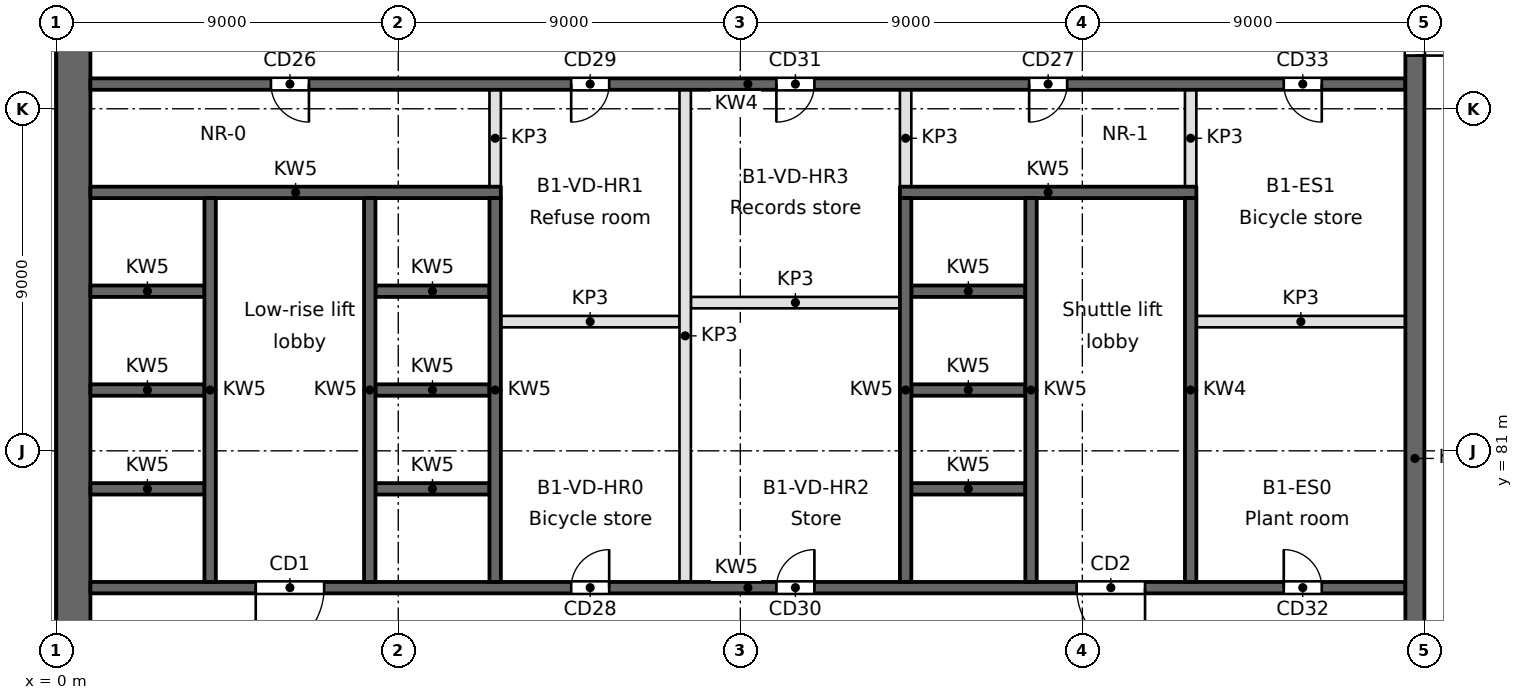
"""IFC4 building model, lengths in metres.
Left out: names, types, materials, properties, quantities, classifications, styles, units other than length and angle.
Written with IfcOpenShell. Run it as: python <this file> out.ifc"""

import sys

from ifc_helpers import new_model, si_unit, direction, frame, frame_2d, origin, place, context, subcontext, project, spatial, rectangle, extrude, element, fill, save


model = new_model("IFC4")
c1 = context("Model", 3, precision=1e-05, world=origin(), true_north=direction((0.0, 1.0)))
c2 = subcontext(c1, "Body", "Model", "MODEL_VIEW")
j1 = project(units=[si_unit("LENGTHUNIT", "METRE"), si_unit("PLANEANGLEUNIT", "RADIAN")], contexts=[c1])
p1 = place(None, origin())
s1 = spatial("IfcSite", under=j1, at=p1, CompositionType="ELEMENT")
p2 = place(p1, origin())
s2 = spatial("IfcBuilding", under=s1, at=p2, CompositionType="ELEMENT")
p3 = place(p2, frame((0.0, 0.0, -6.0)))
s3 = spatial("IfcBuildingStorey", under=s2, at=p3, CompositionType="ELEMENT", Elevation=-6.0)
p4 = place(p3, frame((0.45, 94.5, 0.0), z_axis=(0.0, 0.0, 1.0), x_axis=(0.0, -1.0, 0.0)))
e1 = element("IfcWall", 1, at=p4, inside=s3, PredefinedType="SHEAR", context=c2, shape_type="SweptSolid", body=[
    extrude(rectangle(XDim=66.085, YDim=0.9, at=frame_2d((33.042, 0.0))), origin(), (0.0, 0.0, 1.0), 6.0),
])
p5 = place(p3, frame((0.9, 77.4, 0.0), z_axis=(0.0, 0.0, 1.0), x_axis=(1.0, 0.0, 0.0)))
e2 = element("IfcWall", 2, at=p5, inside=s3, PredefinedType="SOLIDWALL", context=c2, shape_type="SweptSolid", body=[
    extrude(rectangle(XDim=34.6, YDim=0.3, at=frame_2d((17.3, 0.0))), origin(), (0.0, 0.0, 1.0), 5.6),
])
p6 = place(p5, frame((4.35, 0.0, 0.0)))
e3 = element("IfcOpeningElement", 3, at=p6, cuts=e2, PredefinedType="OPENING", context=c2, shape_type="SweptSolid", body=[
    extrude(rectangle(XDim=1.8, YDim=2.1, at=frame_2d((0.9, 1.05))), frame((0.0, 0.15, 0.0), z_axis=(0.0, -1.0, 0.0), x_axis=(1.0, 0.0, 0.0)), (0.0, 0.0, 1.0), 0.3),
])
p7 = place(p5, frame((25.95, 0.0, 0.0)))
e4 = element("IfcOpeningElement", 4, at=p7, cuts=e2, PredefinedType="OPENING", context=c2, shape_type="SweptSolid", body=[
    extrude(rectangle(XDim=1.8, YDim=2.1, at=frame_2d((0.9, 1.05))), frame((0.0, 0.15, 0.0), z_axis=(0.0, -1.0, 0.0), x_axis=(1.0, 0.0, 0.0)), (0.0, 0.0, 1.0), 0.3),
])
p8 = place(p5, frame((12.65, 0.0, 0.0)))
e5 = element("IfcOpeningElement", 5, at=p8, cuts=e2, PredefinedType="OPENING", context=c2, shape_type="SweptSolid", body=[
    extrude(rectangle(XDim=1.0, YDim=2.1, at=frame_2d((0.5, 1.05))), frame((0.0, 0.15, 0.0), z_axis=(0.0, -1.0, 0.0), x_axis=(1.0, 0.0, 0.0)), (0.0, 0.0, 1.0), 0.3),
])
p9 = place(p5, frame((18.05, 0.0, 0.0)))
e6 = element("IfcOpeningElement", 6, at=p9, cuts=e2, PredefinedType="OPENING", context=c2, shape_type="SweptSolid", body=[
    extrude(rectangle(XDim=1.0, YDim=2.1, at=frame_2d((0.5, 1.05))), frame((0.0, 0.15, 0.0), z_axis=(0.0, -1.0, 0.0), x_axis=(1.0, 0.0, 0.0)), (0.0, 0.0, 1.0), 0.3),
])
p10 = place(p5, frame((31.4, 0.0, 0.0)))
e7 = element("IfcOpeningElement", 7, at=p10, cuts=e2, PredefinedType="OPENING", context=c2, shape_type="SweptSolid", body=[
    extrude(rectangle(XDim=1.0, YDim=2.1, at=frame_2d((0.5, 1.05))), frame((0.0, 0.15, 0.0), z_axis=(0.0, -1.0, 0.0), x_axis=(1.0, 0.0, 0.0)), (0.0, 0.0, 1.0), 0.3),
])
for number, where, z_axis, x_axis in (
    (8, (0.9, 80.0, 0.0), (0.0, 0.0, 1.0), (1.0, 0.0, 0.0)),
    (9, (8.4, 80.0, 0.0), (0.0, 0.0, 1.0), (1.0, 0.0, 0.0)),
    (10, (22.5, 80.0, 0.0), (0.0, 0.0, 1.0), (1.0, 0.0, 0.0)),
    (11, (0.9, 82.6, 0.0), (0.0, 0.0, 1.0), (1.0, 0.0, 0.0)),
    (12, (8.4, 82.6, 0.0), (0.0, 0.0, 1.0), (1.0, 0.0, 0.0)),
    (13, (22.5, 82.6, 0.0), (0.0, 0.0, 1.0), (1.0, 0.0, 0.0)),
):
    element("IfcWall", number, at=place(p3, frame(where, z_axis=z_axis, x_axis=x_axis)), inside=s3, PredefinedType="SOLIDWALL", context=c2, shape_type="SweptSolid", body=[
        extrude(rectangle(XDim=3.0, YDim=0.3, at=frame_2d((1.5, 0.0))), origin(), (0.0, 0.0, 1.0), 5.6),
    ])
p11 = place(p3, frame((11.7, 84.4, 0.0), z_axis=(0.0, 0.0, 1.0), x_axis=(1.0, 0.0, 0.0)))
e14 = element("IfcWall", 14, at=p11, inside=s3, PredefinedType="PARTITIONING", context=c2, shape_type="SweptSolid", body=[
    extrude(rectangle(XDim=4.7, YDim=0.3, at=frame_2d((2.35, 0.0))), origin(), (0.0, 0.0, 1.0), 5.6),
])
for number, where, z_axis, x_axis in (
    (15, (30.0, 84.4, 0.0), (0.0, 0.0, 1.0), (1.0, 0.0, 0.0)),
    (16, (16.7, 84.9, 0.0), (0.0, 0.0, 1.0), (1.0, 0.0, 0.0)),
):
    element("IfcWall", number, at=place(p3, frame(where, z_axis=z_axis, x_axis=x_axis)), inside=s3, PredefinedType="PARTITIONING", context=c2, shape_type="SweptSolid", body=[
        extrude(rectangle(XDim=5.5, YDim=0.3, at=frame_2d((2.75, 0.0))), origin(), (0.0, 0.0, 1.0), 5.6),
    ])
for number, where, z_axis, x_axis in (
    (17, (0.9, 85.2, 0.0), (0.0, 0.0, 1.0), (1.0, 0.0, 0.0)),
    (18, (8.4, 85.2, 0.0), (0.0, 0.0, 1.0), (1.0, 0.0, 0.0)),
    (19, (22.5, 85.2, 0.0), (0.0, 0.0, 1.0), (1.0, 0.0, 0.0)),
):
    element("IfcWall", number, at=place(p3, frame(where, z_axis=z_axis, x_axis=x_axis)), inside=s3, PredefinedType="SOLIDWALL", context=c2, shape_type="SweptSolid", body=[
        extrude(rectangle(XDim=3.0, YDim=0.3, at=frame_2d((1.5, 0.0))), origin(), (0.0, 0.0, 1.0), 5.6),
    ])
p12 = place(p3, frame((0.9, 87.8, 0.0), z_axis=(0.0, 0.0, 1.0), x_axis=(1.0, 0.0, 0.0)))
e20 = element("IfcWall", 20, at=p12, inside=s3, PredefinedType="SOLIDWALL", context=c2, shape_type="SweptSolid", body=[
    extrude(rectangle(XDim=10.8, YDim=0.3, at=frame_2d((5.4, 0.0))), origin(), (0.0, 0.0, 1.0), 5.6),
])
p13 = place(p3, frame((22.2, 87.8, 0.0), z_axis=(0.0, 0.0, 1.0), x_axis=(1.0, 0.0, 0.0)))
e21 = element("IfcWall", 21, at=p13, inside=s3, PredefinedType="SOLIDWALL", context=c2, shape_type="SweptSolid", body=[
    extrude(rectangle(XDim=7.8, YDim=0.3, at=frame_2d((3.9, 0.0))), origin(), (0.0, 0.0, 1.0), 5.6),
])
p14 = place(p3, frame((0.9, 90.65, 0.0), z_axis=(0.0, 0.0, 1.0), x_axis=(1.0, 0.0, 0.0)))
e22 = element("IfcWall", 22, at=p14, inside=s3, PredefinedType="SOLIDWALL", context=c2, shape_type="SweptSolid", body=[
    extrude(rectangle(XDim=34.6, YDim=0.3, at=frame_2d((17.3, 0.0))), origin(), (0.0, 0.0, 1.0), 5.6),
])
p15 = place(p14, frame((4.75, 0.0, 0.0)))
e23 = element("IfcOpeningElement", 23, at=p15, cuts=e22, PredefinedType="OPENING", context=c2, shape_type="SweptSolid", body=[
    extrude(rectangle(XDim=1.0, YDim=2.1, at=frame_2d((0.5, 1.05))), frame((0.0, 0.15, 0.0), z_axis=(0.0, -1.0, 0.0), x_axis=(1.0, 0.0, 0.0)), (0.0, 0.0, 1.0), 0.3),
])
p16 = place(p14, frame((24.7, 0.0, 0.0)))
e24 = element("IfcOpeningElement", 24, at=p16, cuts=e22, PredefinedType="OPENING", context=c2, shape_type="SweptSolid", body=[
    extrude(rectangle(XDim=1.0, YDim=2.1, at=frame_2d((0.5, 1.05))), frame((0.0, 0.15, 0.0), z_axis=(0.0, -1.0, 0.0), x_axis=(1.0, 0.0, 0.0)), (0.0, 0.0, 1.0), 0.3),
])
p17 = place(p14, frame((12.65, 0.0, 0.0)))
e25 = element("IfcOpeningElement", 25, at=p17, cuts=e22, PredefinedType="OPENING", context=c2, shape_type="SweptSolid", body=[
    extrude(rectangle(XDim=1.0, YDim=2.1, at=frame_2d((0.5, 1.05))), frame((0.0, 0.15, 0.0), z_axis=(0.0, -1.0, 0.0), x_axis=(1.0, 0.0, 0.0)), (0.0, 0.0, 1.0), 0.3),
])
p18 = place(p14, frame((18.05, 0.0, 0.0)))
e26 = element("IfcOpeningElement", 26, at=p18, cuts=e22, PredefinedType="OPENING", context=c2, shape_type="SweptSolid", body=[
    extrude(rectangle(XDim=1.0, YDim=2.1, at=frame_2d((0.5, 1.05))), frame((0.0, 0.15, 0.0), z_axis=(0.0, -1.0, 0.0), x_axis=(1.0, 0.0, 0.0)), (0.0, 0.0, 1.0), 0.3),
])
p19 = place(p14, frame((31.4, 0.0, 0.0)))
e27 = element("IfcOpeningElement", 27, at=p19, cuts=e22, PredefinedType="OPENING", context=c2, shape_type="SweptSolid", body=[
    extrude(rectangle(XDim=1.0, YDim=2.1, at=frame_2d((0.5, 1.05))), frame((0.0, 0.15, 0.0), z_axis=(0.0, -1.0, 0.0), x_axis=(1.0, 0.0, 0.0)), (0.0, 0.0, 1.0), 0.3),
])
for number, where, z_axis, x_axis in (
    (28, (4.05, 77.55, 0.0), (0.0, 0.0, 1.0), (0.0, 1.0, 0.0)),
    (29, (8.25, 77.55, 0.0), (0.0, 0.0, 1.0), (0.0, 1.0, 0.0)),
    (30, (11.55, 77.55, 0.0), (0.0, 0.0, 1.0), (0.0, 1.0, 0.0)),
):
    element("IfcWall", number, at=place(p3, frame(where, z_axis=z_axis, x_axis=x_axis)), inside=s3, PredefinedType="SOLIDWALL", context=c2, shape_type="SweptSolid", body=[
        extrude(rectangle(XDim=10.1, YDim=0.3, at=frame_2d((5.05, 0.0))), origin(), (0.0, 0.0, 1.0), 5.6),
    ])
p20 = place(p3, frame((11.55, 87.95, 0.0), z_axis=(0.0, 0.0, 1.0), x_axis=(0.0, 1.0, 0.0)))
e31 = element("IfcWall", 31, at=p20, inside=s3, PredefinedType="PARTITIONING", context=c2, shape_type="SweptSolid", body=[
    extrude(rectangle(XDim=2.55, YDim=0.3, at=frame_2d((1.275, 0.0))), origin(), (0.0, 0.0, 1.0), 5.6),
])
p21 = place(p3, frame((16.55, 77.55, 0.0), z_axis=(0.0, 0.0, 1.0), x_axis=(0.0, 1.0, 0.0)))
e32 = element("IfcWall", 32, at=p21, inside=s3, PredefinedType="PARTITIONING", context=c2, shape_type="SweptSolid", body=[
    extrude(rectangle(XDim=12.95, YDim=0.3, at=frame_2d((6.475, 0.0))), origin(), (0.0, 0.0, 1.0), 5.6),
])
p22 = place(p3, frame((22.35, 77.55, 0.0), z_axis=(0.0, 0.0, 1.0), x_axis=(0.0, 1.0, 0.0)))
e33 = element("IfcWall", 33, at=p22, inside=s3, PredefinedType="SOLIDWALL", context=c2, shape_type="SweptSolid", body=[
    extrude(rectangle(XDim=10.1, YDim=0.3, at=frame_2d((5.05, 0.0))), origin(), (0.0, 0.0, 1.0), 5.6),
])
p23 = place(p3, frame((22.35, 87.95, 0.0), z_axis=(0.0, 0.0, 1.0), x_axis=(0.0, 1.0, 0.0)))
e34 = element("IfcWall", 34, at=p23, inside=s3, PredefinedType="PARTITIONING", context=c2, shape_type="SweptSolid", body=[
    extrude(rectangle(XDim=2.55, YDim=0.3, at=frame_2d((1.275, 0.0))), origin(), (0.0, 0.0, 1.0), 5.6),
])
for number, where, z_axis, x_axis in (
    (35, (25.65, 77.55, 0.0), (0.0, 0.0, 1.0), (0.0, 1.0, 0.0)),
    (36, (29.85, 77.55, 0.0), (0.0, 0.0, 1.0), (0.0, 1.0, 0.0)),
):
    element("IfcWall", number, at=place(p3, frame(where, z_axis=z_axis, x_axis=x_axis)), inside=s3, PredefinedType="SOLIDWALL", context=c2, shape_type="SweptSolid", body=[
        extrude(rectangle(XDim=10.1, YDim=0.3, at=frame_2d((5.05, 0.0))), origin(), (0.0, 0.0, 1.0), 5.6),
    ])
p24 = place(p3, frame((29.85, 87.95, 0.0), z_axis=(0.0, 0.0, 1.0), x_axis=(0.0, 1.0, 0.0)))
e37 = element("IfcWall", 37, at=p24, inside=s3, PredefinedType="PARTITIONING", context=c2, shape_type="SweptSolid", body=[
    extrude(rectangle(XDim=2.55, YDim=0.3, at=frame_2d((1.275, 0.0))), origin(), (0.0, 0.0, 1.0), 5.6),
])
p25 = place(p3, frame((35.75, 63.5, 0.0), z_axis=(0.0, 0.0, 1.0), x_axis=(0.0, 1.0, 0.0)))
e38 = element("IfcWall", 38, at=p25, inside=s3, PredefinedType="SOLIDWALL", context=c2, shape_type="SweptSolid", body=[
    extrude(rectangle(XDim=34.6, YDim=0.5, at=frame_2d((17.3, 0.0))), origin(), (0.0, 0.0, 1.0), 5.6),
])
p26 = place(p25, frame((9.7, 0.0, 0.0)))
e39 = element("IfcOpeningElement", 39, at=p26, cuts=e38, PredefinedType="OPENING", context=c2, shape_type="SweptSolid", body=[
    extrude(rectangle(XDim=2.4, YDim=2.1, at=frame_2d((1.2, 1.05))), frame((0.0, 0.25, 0.0), z_axis=(0.0, -1.0, 0.0), x_axis=(1.0, 0.0, 0.0)), (0.0, 0.0, 1.0), 0.5),
])
p27 = place(p25, frame((27.9, 0.0, 0.0)))
e40 = element("IfcOpeningElement", 40, at=p27, cuts=e38, PredefinedType="OPENING", context=c2, shape_type="SweptSolid", body=[
    extrude(rectangle(XDim=1.5, YDim=2.1, at=frame_2d((0.75, 1.05))), frame((0.0, 0.25, 0.0), z_axis=(0.0, -1.0, 0.0), x_axis=(1.0, 0.0, 0.0)), (0.0, 0.0, 1.0), 0.5),
])
p28 = place(p25, frame((1.5, 0.0, 0.0)))
e41 = element("IfcOpeningElement", 41, at=p28, cuts=e38, PredefinedType="OPENING", context=c2, shape_type="SweptSolid", body=[
    extrude(rectangle(XDim=1.2, YDim=2.1, at=frame_2d((0.6, 1.05))), frame((0.0, 0.25, 0.0), z_axis=(0.0, -1.0, 0.0), x_axis=(1.0, 0.0, 0.0)), (0.0, 0.0, 1.0), 0.5),
])
p29 = place(p6, frame((1.8, 0.0, 0.0), z_axis=(0.0, 0.0, 1.0), x_axis=(-1.0, 0.0, 0.0)))
e42 = element("IfcDoor", 42, at=p29, inside=s3, OperationType="SINGLE_SWING_RIGHT", PredefinedType="DOOR", context=c2, shape_type="SweptSolid", body=[
    extrude(rectangle(XDim=1.8, YDim=2.1, at=frame_2d((0.9, 1.05))), frame((0.0, 0.025, 0.0), z_axis=(0.0, -1.0, 0.0), x_axis=(1.0, 0.0, 0.0)), (0.0, 0.0, 1.0), 0.05),
])
fill(e3, e42)
p30 = place(p7, frame((1.8, 0.0, 0.0), z_axis=(0.0, 0.0, 1.0), x_axis=(-1.0, 0.0, 0.0)))
e43 = element("IfcDoor", 43, at=p30, inside=s3, OperationType="SINGLE_SWING_LEFT", PredefinedType="DOOR", context=c2, shape_type="SweptSolid", body=[
    extrude(rectangle(XDim=1.8, YDim=2.1, at=frame_2d((0.9, 1.05))), frame((0.0, 0.025, 0.0), z_axis=(0.0, -1.0, 0.0), x_axis=(1.0, 0.0, 0.0)), (0.0, 0.0, 1.0), 0.05),
])
fill(e4, e43)
p31 = place(p27, frame((1.5, 0.0, 0.0), z_axis=(0.0, 0.0, 1.0), x_axis=(-1.0, 0.0, 0.0)))
e44 = element("IfcDoor", 44, at=p31, inside=s3, OperationType="SINGLE_SWING_RIGHT", PredefinedType="DOOR", context=c2, shape_type="SweptSolid", body=[
    extrude(rectangle(XDim=1.5, YDim=2.1, at=frame_2d((0.75, 1.05))), frame((0.0, 0.025, 0.0), z_axis=(0.0, -1.0, 0.0), x_axis=(1.0, 0.0, 0.0)), (0.0, 0.0, 1.0), 0.05),
])
fill(e40, e44)
p32 = place(p15, frame((1.0, 0.0, 0.0), z_axis=(0.0, 0.0, 1.0), x_axis=(-1.0, 0.0, 0.0)))
e45 = element("IfcDoor", 45, at=p32, inside=s3, OperationType="SINGLE_SWING_LEFT", PredefinedType="DOOR", context=c2, shape_type="SweptSolid", body=[
    extrude(rectangle(XDim=1.0, YDim=2.1, at=frame_2d((0.5, 1.05))), frame((0.0, 0.025, 0.0), z_axis=(0.0, -1.0, 0.0), x_axis=(1.0, 0.0, 0.0)), (0.0, 0.0, 1.0), 0.05),
])
fill(e23, e45)
p33 = place(p16, frame((1.0, 0.0, 0.0), z_axis=(0.0, 0.0, 1.0), x_axis=(-1.0, 0.0, 0.0)))
e46 = element("IfcDoor", 46, at=p33, inside=s3, OperationType="SINGLE_SWING_RIGHT", PredefinedType="DOOR", context=c2, shape_type="SweptSolid", body=[
    extrude(rectangle(XDim=1.0, YDim=2.1, at=frame_2d((0.5, 1.05))), frame((0.0, 0.025, 0.0), z_axis=(0.0, -1.0, 0.0), x_axis=(1.0, 0.0, 0.0)), (0.0, 0.0, 1.0), 0.05),
])
fill(e24, e46)
p34 = place(p8, origin())
e47 = element("IfcDoor", 47, at=p34, inside=s3, OperationType="SINGLE_SWING_RIGHT", PredefinedType="DOOR", context=c2, shape_type="SweptSolid", body=[
    extrude(rectangle(XDim=1.0, YDim=2.1, at=frame_2d((0.5, 1.05))), frame((0.0, 0.025, 0.0), z_axis=(0.0, -1.0, 0.0), x_axis=(1.0, 0.0, 0.0)), (0.0, 0.0, 1.0), 0.05),
])
fill(e5, e47)
p35 = place(p17, frame((1.0, 0.0, 0.0), z_axis=(0.0, 0.0, 1.0), x_axis=(-1.0, 0.0, 0.0)))
e48 = element("IfcDoor", 48, at=p35, inside=s3, OperationType="SINGLE_SWING_RIGHT", PredefinedType="DOOR", context=c2, shape_type="SweptSolid", body=[
    extrude(rectangle(XDim=1.0, YDim=2.1, at=frame_2d((0.5, 1.05))), frame((0.0, 0.025, 0.0), z_axis=(0.0, -1.0, 0.0), x_axis=(1.0, 0.0, 0.0)), (0.0, 0.0, 1.0), 0.05),
])
fill(e25, e48)
p36 = place(p9, origin())
e49 = element("IfcDoor", 49, at=p36, inside=s3, OperationType="SINGLE_SWING_RIGHT", PredefinedType="DOOR", context=c2, shape_type="SweptSolid", body=[
    extrude(rectangle(XDim=1.0, YDim=2.1, at=frame_2d((0.5, 1.05))), frame((0.0, 0.025, 0.0), z_axis=(0.0, -1.0, 0.0), x_axis=(1.0, 0.0, 0.0)), (0.0, 0.0, 1.0), 0.05),
])
fill(e6, e49)
p37 = place(p18, frame((1.0, 0.0, 0.0), z_axis=(0.0, 0.0, 1.0), x_axis=(-1.0, 0.0, 0.0)))
e50 = element("IfcDoor", 50, at=p37, inside=s3, OperationType="SINGLE_SWING_RIGHT", PredefinedType="DOOR", context=c2, shape_type="SweptSolid", body=[
    extrude(rectangle(XDim=1.0, YDim=2.1, at=frame_2d((0.5, 1.05))), frame((0.0, 0.025, 0.0), z_axis=(0.0, -1.0, 0.0), x_axis=(1.0, 0.0, 0.0)), (0.0, 0.0, 1.0), 0.05),
])
fill(e26, e50)
p38 = place(p10, origin())
e51 = element("IfcDoor", 51, at=p38, inside=s3, OperationType="SINGLE_SWING_LEFT", PredefinedType="DOOR", context=c2, shape_type="SweptSolid", body=[
    extrude(rectangle(XDim=1.0, YDim=2.1, at=frame_2d((0.5, 1.05))), frame((0.0, 0.025, 0.0), z_axis=(0.0, -1.0, 0.0), x_axis=(1.0, 0.0, 0.0)), (0.0, 0.0, 1.0), 0.05),
])
fill(e7, e51)
p39 = place(p19, frame((1.0, 0.0, 0.0), z_axis=(0.0, 0.0, 1.0), x_axis=(-1.0, 0.0, 0.0)))
e52 = element("IfcDoor", 52, at=p39, inside=s3, OperationType="SINGLE_SWING_LEFT", PredefinedType="DOOR", context=c2, shape_type="SweptSolid", body=[
    extrude(rectangle(XDim=1.0, YDim=2.1, at=frame_2d((0.5, 1.05))), frame((0.0, 0.025, 0.0), z_axis=(0.0, -1.0, 0.0), x_axis=(1.0, 0.0, 0.0)), (0.0, 0.0, 1.0), 0.05),
])
fill(e27, e52)
save(model, sys.argv[1])
